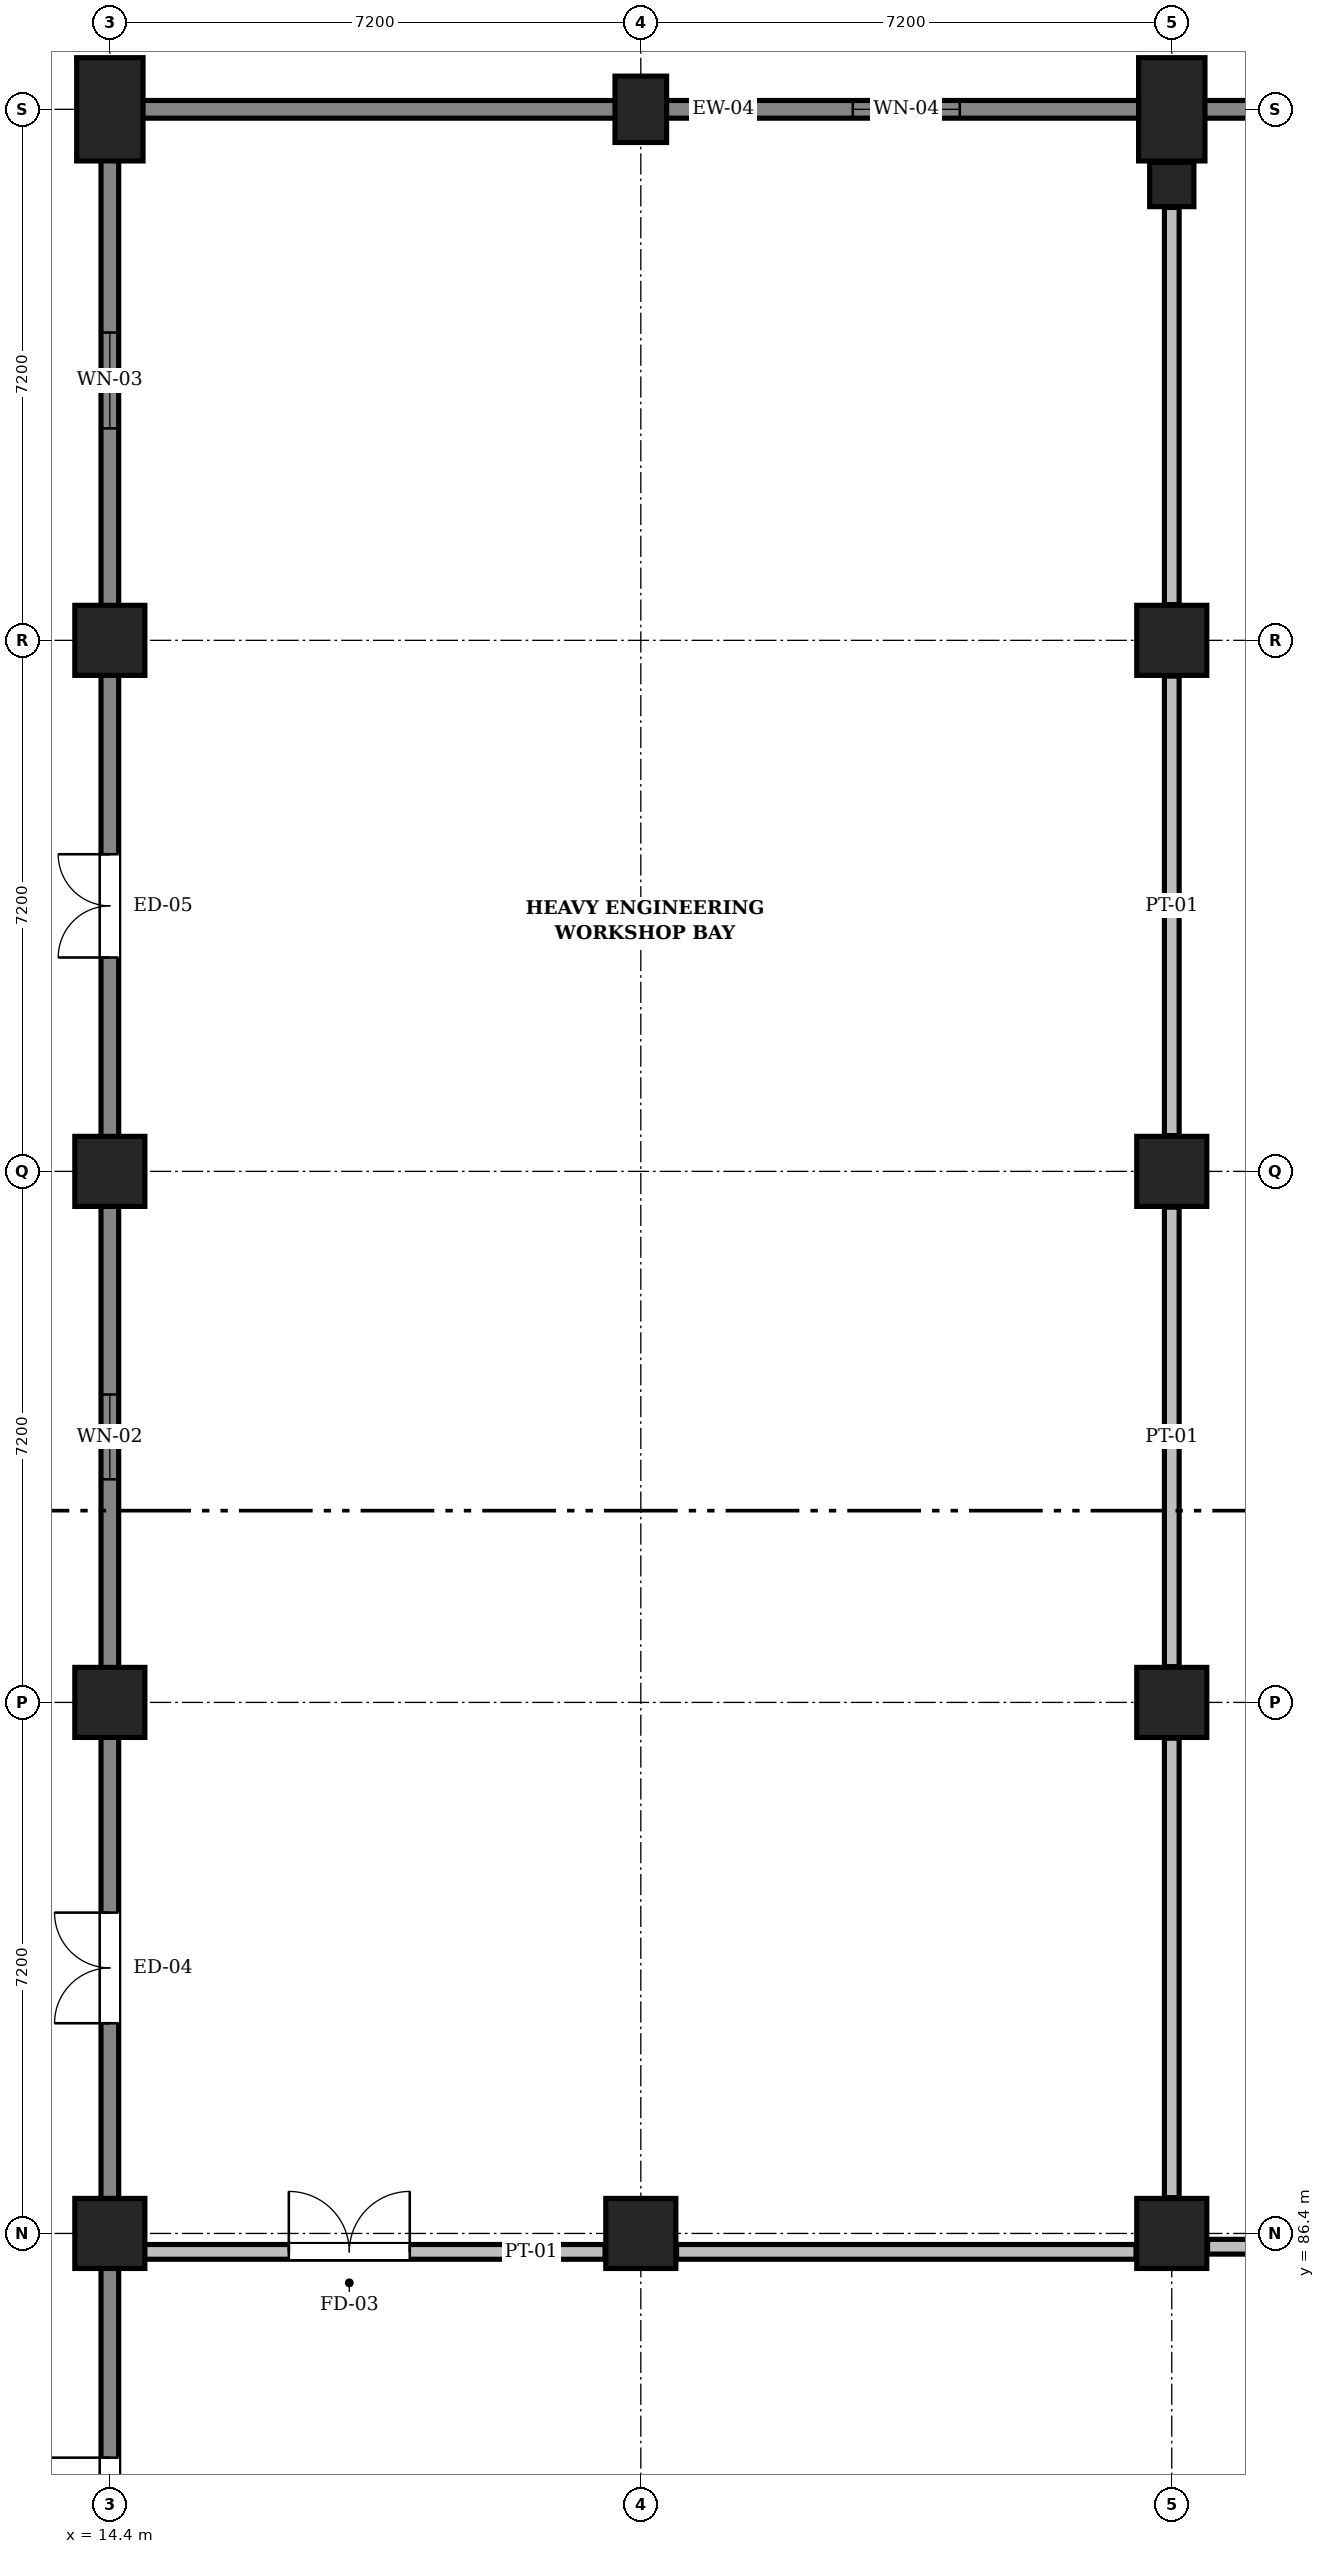
"""IFC4 building model, lengths in metres.
Left out: names, types, materials, properties, quantities, classifications, styles, units other than length and angle.
Written with IfcOpenShell. Run it as: python <this file> out.ifc"""

import sys

from ifc_helpers import new_model, si_unit, direction, frame, frame_2d, origin, origin_2d, place, context, subcontext, project, spatial, rectangle, extrude, element, fill, save


model = new_model("IFC4")
c1 = context("Model", 3, precision=1e-05, world=origin(), true_north=direction((0.0, 1.0)))
c2 = subcontext(c1, "Body", "Model", "MODEL_VIEW")
j1 = project(units=[si_unit("LENGTHUNIT", "METRE"), si_unit("PLANEANGLEUNIT", "RADIAN")], contexts=[c1])
p1 = place(None, origin())
s1 = spatial("IfcSite", under=j1, at=p1, CompositionType="ELEMENT")
p2 = place(p1, origin())
s2 = spatial("IfcBuilding", under=s1, at=p2, CompositionType="ELEMENT")
p3 = place(p2, origin())
s3 = spatial("IfcBuildingStorey", under=s2, at=p3, CompositionType="ELEMENT", Elevation=0.0)
for number, where, z_axis, x_axis in (
    (1, (14.4, 86.4, 0.0), (0.0, 0.0, 1.0), (1.0, 0.0, 0.0)),
    (2, (14.4, 93.6, 0.0), (0.0, 0.0, 1.0), (1.0, 0.0, 0.0)),
    (3, (14.4, 100.8, 0.0), (0.0, 0.0, 1.0), (1.0, 0.0, 0.0)),
    (4, (14.4, 108.0, 0.0), (0.0, 0.0, 1.0), (1.0, 0.0, 0.0)),
):
    element("IfcColumn", number, at=place(p3, frame(where, z_axis=z_axis, x_axis=x_axis)), inside=s3, PredefinedType="COLUMN", context=c2, shape_type="SweptSolid", body=[
        extrude(rectangle(XDim=0.95, YDim=0.95, at=origin_2d()), origin(), (0.0, 0.0, 1.0), 4.8),
    ])
p4 = place(p3, frame((14.4, 115.2, 0.0), z_axis=(0.0, 0.0, 1.0), x_axis=(1.0, 0.0, 0.0)))
e5 = element("IfcColumn", 5, at=p4, inside=s3, PredefinedType="COLUMN", context=c2, shape_type="SweptSolid", body=[
    extrude(rectangle(XDim=0.9, YDim=1.4, at=origin_2d()), origin(), (0.0, 0.0, 1.0), 4.8),
])
p5 = place(p3, frame((21.6, 86.4, 0.0), z_axis=(0.0, 0.0, 1.0), x_axis=(1.0, 0.0, 0.0)))
e6 = element("IfcColumn", 6, at=p5, inside=s3, PredefinedType="COLUMN", context=c2, shape_type="SweptSolid", body=[
    extrude(rectangle(XDim=0.95, YDim=0.95, at=origin_2d()), origin(), (0.0, 0.0, 1.0), 4.8),
])
p6 = place(p3, frame((21.6, 115.2, 0.0), z_axis=(0.0, 0.0, 1.0), x_axis=(1.0, 0.0, 0.0)))
e7 = element("IfcColumn", 7, at=p6, inside=s3, PredefinedType="COLUMN", context=c2, shape_type="SweptSolid", body=[
    extrude(rectangle(XDim=0.7, YDim=0.9, at=origin_2d()), origin(), (0.0, 0.0, 1.0), 4.8),
])
for number, where, z_axis, x_axis in (
    (8, (28.8, 86.4, 0.0), (0.0, 0.0, 1.0), (1.0, 0.0, 0.0)),
    (9, (28.8, 93.6, 0.0), (0.0, 0.0, 1.0), (1.0, 0.0, 0.0)),
    (10, (28.8, 100.8, 0.0), (0.0, 0.0, 1.0), (1.0, 0.0, 0.0)),
    (11, (28.8, 108.0, 0.0), (0.0, 0.0, 1.0), (1.0, 0.0, 0.0)),
):
    element("IfcColumn", number, at=place(p3, frame(where, z_axis=z_axis, x_axis=x_axis)), inside=s3, PredefinedType="COLUMN", context=c2, shape_type="SweptSolid", body=[
        extrude(rectangle(XDim=0.95, YDim=0.95, at=origin_2d()), origin(), (0.0, 0.0, 1.0), 4.8),
    ])
p7 = place(p3, frame((28.8, 115.2, 0.0), z_axis=(0.0, 0.0, 1.0), x_axis=(1.0, 0.0, 0.0)))
e12 = element("IfcColumn", 12, at=p7, inside=s3, PredefinedType="COLUMN", context=c2, shape_type="SweptSolid", body=[
    extrude(rectangle(XDim=0.9, YDim=1.4, at=origin_2d()), origin(), (0.0, 0.0, 1.0), 4.8),
])
p8 = place(p3, frame((28.8, 114.18, 0.0), z_axis=(0.0, 0.0, 1.0), x_axis=(1.0, 0.0, 0.0)))
e13 = element("IfcColumn", 13, at=p8, inside=s3, PredefinedType="COLUMN", context=c2, shape_type="SweptSolid", body=[
    extrude(rectangle(XDim=0.6, YDim=0.6, at=origin_2d()), origin(), (0.0, 0.0, 1.0), 4.8),
])
p9 = place(p3, frame((14.4, 79.352, 0.0), z_axis=(0.0, 0.0, 1.0), x_axis=(0.0, 1.0, 0.0)))
e14 = element("IfcWall", 14, at=p9, inside=s3, PredefinedType="SOLIDWALL", context=c2, shape_type="SweptSolid", body=[
    extrude(rectangle(XDim=7.048, YDim=0.24, at=frame_2d((3.524, 0.0))), origin(), (0.0, 0.0, 1.0), 4.52),
])
p10 = place(p9, frame((2.888, 0.0, 0.0)))
e15 = element("IfcOpeningElement", 15, at=p10, cuts=e14, PredefinedType="OPENING", context=c2, shape_type="SweptSolid", body=[
    extrude(rectangle(XDim=1.12, YDim=2.15, at=frame_2d((0.56, 1.075))), frame((0.0, 0.132, 0.0), z_axis=(0.0, -1.0, 0.0), x_axis=(1.0, 0.0, 0.0)), (0.0, 0.0, 1.0), 0.264),
])
p11 = place(p3, frame((14.4, 86.4, 0.0), z_axis=(0.0, 0.0, 1.0), x_axis=(0.0, 1.0, 0.0)))
e16 = element("IfcWall", 16, at=p11, inside=s3, PredefinedType="SOLIDWALL", context=c2, shape_type="SweptSolid", body=[
    extrude(rectangle(XDim=7.2, YDim=0.24, at=frame_2d((3.6, 0.0))), origin(), (0.0, 0.0, 1.0), 4.52),
])
p12 = place(p11, frame((2.85, 0.0, 0.0)))
e17 = element("IfcOpeningElement", 17, at=p12, cuts=e16, PredefinedType="OPENING", context=c2, shape_type="SweptSolid", body=[
    extrude(rectangle(XDim=1.5, YDim=2.15, at=frame_2d((0.75, 1.075))), frame((0.0, 0.132, 0.0), z_axis=(0.0, -1.0, 0.0), x_axis=(1.0, 0.0, 0.0)), (0.0, 0.0, 1.0), 0.264),
])
p13 = place(p3, frame((14.4, 93.6, 0.0), z_axis=(0.0, 0.0, 1.0), x_axis=(0.0, 1.0, 0.0)))
e18 = element("IfcWall", 18, at=p13, inside=s3, PredefinedType="SOLIDWALL", context=c2, shape_type="SweptSolid", body=[
    extrude(rectangle(XDim=7.2, YDim=0.24, at=frame_2d((3.6, 0.0))), origin(), (0.0, 0.0, 1.0), 4.52),
])
p14 = place(p13, frame((3.025, 0.0, 0.95)))
e19 = element("IfcOpeningElement", 19, at=p14, cuts=e18, PredefinedType="OPENING", context=c2, shape_type="SweptSolid", body=[
    extrude(rectangle(XDim=1.15, YDim=1.3, at=frame_2d((0.575, 0.65))), frame((0.0, 0.132, 0.0), z_axis=(0.0, -1.0, 0.0), x_axis=(1.0, 0.0, 0.0)), (0.0, 0.0, 1.0), 0.264),
])
p15 = place(p3, frame((14.4, 100.8, 0.0), z_axis=(0.0, 0.0, 1.0), x_axis=(0.0, 1.0, 0.0)))
e20 = element("IfcWall", 20, at=p15, inside=s3, PredefinedType="SOLIDWALL", context=c2, shape_type="SweptSolid", body=[
    extrude(rectangle(XDim=7.2, YDim=0.24, at=frame_2d((3.6, 0.0))), origin(), (0.0, 0.0, 1.0), 4.52),
])
p16 = place(p15, frame((2.9, 0.0, 0.0)))
e21 = element("IfcOpeningElement", 21, at=p16, cuts=e20, PredefinedType="OPENING", context=c2, shape_type="SweptSolid", body=[
    extrude(rectangle(XDim=1.4, YDim=2.15, at=frame_2d((0.7, 1.075))), frame((0.0, 0.132, 0.0), z_axis=(0.0, -1.0, 0.0), x_axis=(1.0, 0.0, 0.0)), (0.0, 0.0, 1.0), 0.264),
])
p17 = place(p3, frame((14.4, 108.0, 0.0), z_axis=(0.0, 0.0, 1.0), x_axis=(0.0, 1.0, 0.0)))
e22 = element("IfcWall", 22, at=p17, inside=s3, PredefinedType="SOLIDWALL", context=c2, shape_type="SweptSolid", body=[
    extrude(rectangle(XDim=7.048, YDim=0.24, at=frame_2d((3.524, 0.0))), origin(), (0.0, 0.0, 1.0), 4.52),
])
p18 = place(p17, frame((2.874, 0.0, 0.95)))
e23 = element("IfcOpeningElement", 23, at=p18, cuts=e22, PredefinedType="OPENING", context=c2, shape_type="SweptSolid", body=[
    extrude(rectangle(XDim=1.3, YDim=1.3, at=frame_2d((0.65, 0.65))), frame((0.0, 0.132, 0.0), z_axis=(0.0, -1.0, 0.0), x_axis=(1.0, 0.0, 0.0)), (0.0, 0.0, 1.0), 0.264),
])
p19 = place(p3, frame((14.25, 115.2, 0.0), z_axis=(0.0, 0.0, 1.0), x_axis=(1.0, 0.0, 0.0)))
e24 = element("IfcWall", 24, at=p19, inside=s3, PredefinedType="SOLIDWALL", context=c2, shape_type="SweptSolid", body=[
    extrude(rectangle(XDim=7.35, YDim=0.24, at=frame_2d((3.675, 0.0))), origin(), (0.0, 0.0, 1.0), 4.52),
])
p20 = place(p3, frame((21.6, 115.2, 0.0), z_axis=(0.0, 0.0, 1.0), x_axis=(1.0, 0.0, 0.0)))
e25 = element("IfcWall", 25, at=p20, inside=s3, PredefinedType="SOLIDWALL", context=c2, shape_type="SweptSolid", body=[
    extrude(rectangle(XDim=7.2, YDim=0.24, at=frame_2d((3.6, 0.0))), origin(), (0.0, 0.0, 1.0), 4.52),
])
p21 = place(p20, frame((2.875, 0.0, 0.95)))
e26 = element("IfcOpeningElement", 26, at=p21, cuts=e25, PredefinedType="OPENING", context=c2, shape_type="SweptSolid", body=[
    extrude(rectangle(XDim=1.45, YDim=1.3, at=frame_2d((0.725, 0.65))), frame((0.0, 0.132, 0.0), z_axis=(0.0, -1.0, 0.0), x_axis=(1.0, 0.0, 0.0)), (0.0, 0.0, 1.0), 0.264),
])
p22 = place(p3, frame((28.8, 115.2, 0.0), z_axis=(0.0, 0.0, 1.0), x_axis=(1.0, 0.0, 0.0)))
e27 = element("IfcWall", 27, at=p22, inside=s3, PredefinedType="SOLIDWALL", context=c2, shape_type="SweptSolid", body=[
    extrude(rectangle(XDim=7.2, YDim=0.24, at=frame_2d((3.6, 0.0))), origin(), (0.0, 0.0, 1.0), 4.52),
])
p23 = place(p22, frame((3.04, 0.0, 0.0)))
e28 = element("IfcOpeningElement", 28, at=p23, cuts=e27, PredefinedType="OPENING", context=c2, shape_type="SweptSolid", body=[
    extrude(rectangle(XDim=1.12, YDim=2.15, at=frame_2d((0.56, 1.075))), frame((0.0, 0.132, 0.0), z_axis=(0.0, -1.0, 0.0), x_axis=(1.0, 0.0, 0.0)), (0.0, 0.0, 1.0), 0.264),
])
p24 = place(p3, frame((14.532, 86.15, 0.0), z_axis=(0.0, 0.0, 1.0), x_axis=(1.0, 0.0, 0.0)))
e29 = element("IfcWall", 29, at=p24, inside=s3, PredefinedType="PARTITIONING", context=c2, shape_type="SweptSolid", body=[
    extrude(rectangle(XDim=6.583, YDim=0.2, at=frame_2d((3.292, 0.0))), origin(), (0.0, 0.0, 1.0), 3.73),
])
p25 = place(p24, frame((2.295, 0.0, 0.0)))
e30 = element("IfcOpeningElement", 30, at=p25, cuts=e29, PredefinedType="OPENING", context=c2, shape_type="SweptSolid", body=[
    extrude(rectangle(XDim=1.64, YDim=2.24, at=frame_2d((0.82, 1.12))), frame((0.0, 0.112, 0.0), z_axis=(0.0, -1.0, 0.0), x_axis=(1.0, 0.0, 0.0)), (0.0, 0.0, 1.0), 0.224),
])
p26 = place(p3, frame((22.085, 86.15, 0.0), z_axis=(0.0, 0.0, 1.0), x_axis=(1.0, 0.0, 0.0)))
e31 = element("IfcWall", 31, at=p26, inside=s3, PredefinedType="PARTITIONING", context=c2, shape_type="SweptSolid", body=[
    extrude(rectangle(XDim=6.23, YDim=0.2, at=frame_2d((3.115, 0.0))), origin(), (0.0, 0.0, 1.0), 3.73),
])
p27 = place(p3, frame((29.285, 86.22, 0.0), z_axis=(0.0, 0.0, 1.0), x_axis=(1.0, 0.0, 0.0)))
e32 = element("IfcWall", 32, at=p27, inside=s3, PredefinedType="PARTITIONING", context=c2, shape_type="SweptSolid", body=[
    extrude(rectangle(XDim=6.23, YDim=0.2, at=frame_2d((3.115, 0.0))), origin(), (0.0, 0.0, 1.0), 4.46),
])
for number, where, z_axis, x_axis in (
    (33, (28.8, 94.085, 0.0), (0.0, 0.0, 1.0), (0.0, 1.0, 0.0)),
    (34, (28.8, 101.285, 0.0), (0.0, 0.0, 1.0), (0.0, 1.0, 0.0)),
    (35, (28.8, 86.885, 0.0), (0.0, 0.0, 1.0), (0.0, 1.0, 0.0)),
):
    element("IfcWall", number, at=place(p3, frame(where, z_axis=z_axis, x_axis=x_axis)), inside=s3, PredefinedType="PARTITIONING", context=c2, shape_type="SweptSolid", body=[
        extrude(rectangle(XDim=6.23, YDim=0.2, at=frame_2d((3.115, 0.0))), origin(), (0.0, 0.0, 1.0), 4.08),
    ])
p28 = place(p3, frame((28.8, 108.485, 0.0), z_axis=(0.0, 0.0, 1.0), x_axis=(0.0, 1.0, 0.0)))
e36 = element("IfcWall", 36, at=p28, inside=s3, PredefinedType="PARTITIONING", context=c2, shape_type="SweptSolid", body=[
    extrude(rectangle(XDim=5.385, YDim=0.2, at=frame_2d((2.692, 0.0))), origin(), (0.0, 0.0, 1.0), 4.08),
])
p29 = place(p10, origin())
e37 = element("IfcDoor", 37, at=p29, inside=s3, OperationType="SINGLE_SWING_RIGHT", PredefinedType="DOOR", context=c2, shape_type="SweptSolid", body=[
    extrude(rectangle(XDim=1.12, YDim=2.15, at=frame_2d((0.56, 1.075))), frame((0.0, 0.025, 0.0), z_axis=(0.0, -1.0, 0.0), x_axis=(1.0, 0.0, 0.0)), (0.0, 0.0, 1.0), 0.05),
])
fill(e15, e37)
p30 = place(p12, origin())
e38 = element("IfcDoor", 38, at=p30, inside=s3, OperationType="DOUBLE_DOOR_SINGLE_SWING", PredefinedType="DOOR", context=c2, shape_type="SweptSolid", body=[
    extrude(rectangle(XDim=1.5, YDim=2.15, at=frame_2d((0.75, 1.075))), frame((0.0, 0.025, 0.0), z_axis=(0.0, -1.0, 0.0), x_axis=(1.0, 0.0, 0.0)), (0.0, 0.0, 1.0), 0.05),
])
fill(e17, e38)
p31 = place(p14, origin())
e39 = element("IfcWindow", 39, at=p31, inside=s3, PartitioningType="SINGLE_PANEL", PredefinedType="WINDOW", context=c2, shape_type="SweptSolid", body=[
    extrude(rectangle(XDim=1.15, YDim=1.3, at=frame_2d((0.575, 0.65))), frame((0.0, 0.03, 0.0), z_axis=(0.0, -1.0, 0.0), x_axis=(1.0, 0.0, 0.0)), (0.0, 0.0, 1.0), 0.06),
])
fill(e19, e39)
p32 = place(p16, origin())
e40 = element("IfcDoor", 40, at=p32, inside=s3, OperationType="DOUBLE_DOOR_SINGLE_SWING", PredefinedType="DOOR", context=c2, shape_type="SweptSolid", body=[
    extrude(rectangle(XDim=1.4, YDim=2.15, at=frame_2d((0.7, 1.075))), frame((0.0, 0.025, 0.0), z_axis=(0.0, -1.0, 0.0), x_axis=(1.0, 0.0, 0.0)), (0.0, 0.0, 1.0), 0.05),
])
fill(e21, e40)
p33 = place(p18, origin())
e41 = element("IfcWindow", 41, at=p33, inside=s3, PartitioningType="SINGLE_PANEL", PredefinedType="WINDOW", context=c2, shape_type="SweptSolid", body=[
    extrude(rectangle(XDim=1.3, YDim=1.3, at=frame_2d((0.65, 0.65))), frame((0.0, 0.03, 0.0), z_axis=(0.0, -1.0, 0.0), x_axis=(1.0, 0.0, 0.0)), (0.0, 0.0, 1.0), 0.06),
])
fill(e23, e41)
p34 = place(p21, origin())
e42 = element("IfcWindow", 42, at=p34, inside=s3, PartitioningType="SINGLE_PANEL", PredefinedType="WINDOW", context=c2, shape_type="SweptSolid", body=[
    extrude(rectangle(XDim=1.45, YDim=1.3, at=frame_2d((0.725, 0.65))), frame((0.0, 0.03, 0.0), z_axis=(0.0, -1.0, 0.0), x_axis=(1.0, 0.0, 0.0)), (0.0, 0.0, 1.0), 0.06),
])
fill(e26, e42)
p35 = place(p25, origin())
e43 = element("IfcDoor", 43, at=p35, inside=s3, OperationType="DOUBLE_DOOR_SINGLE_SWING", PredefinedType="DOOR", context=c2, shape_type="SweptSolid", body=[
    extrude(rectangle(XDim=1.64, YDim=2.24, at=frame_2d((0.82, 1.12))), frame((0.0, 0.025, 0.0), z_axis=(0.0, -1.0, 0.0), x_axis=(1.0, 0.0, 0.0)), (0.0, 0.0, 1.0), 0.05),
])
fill(e30, e43)
save(model, sys.argv[1])
